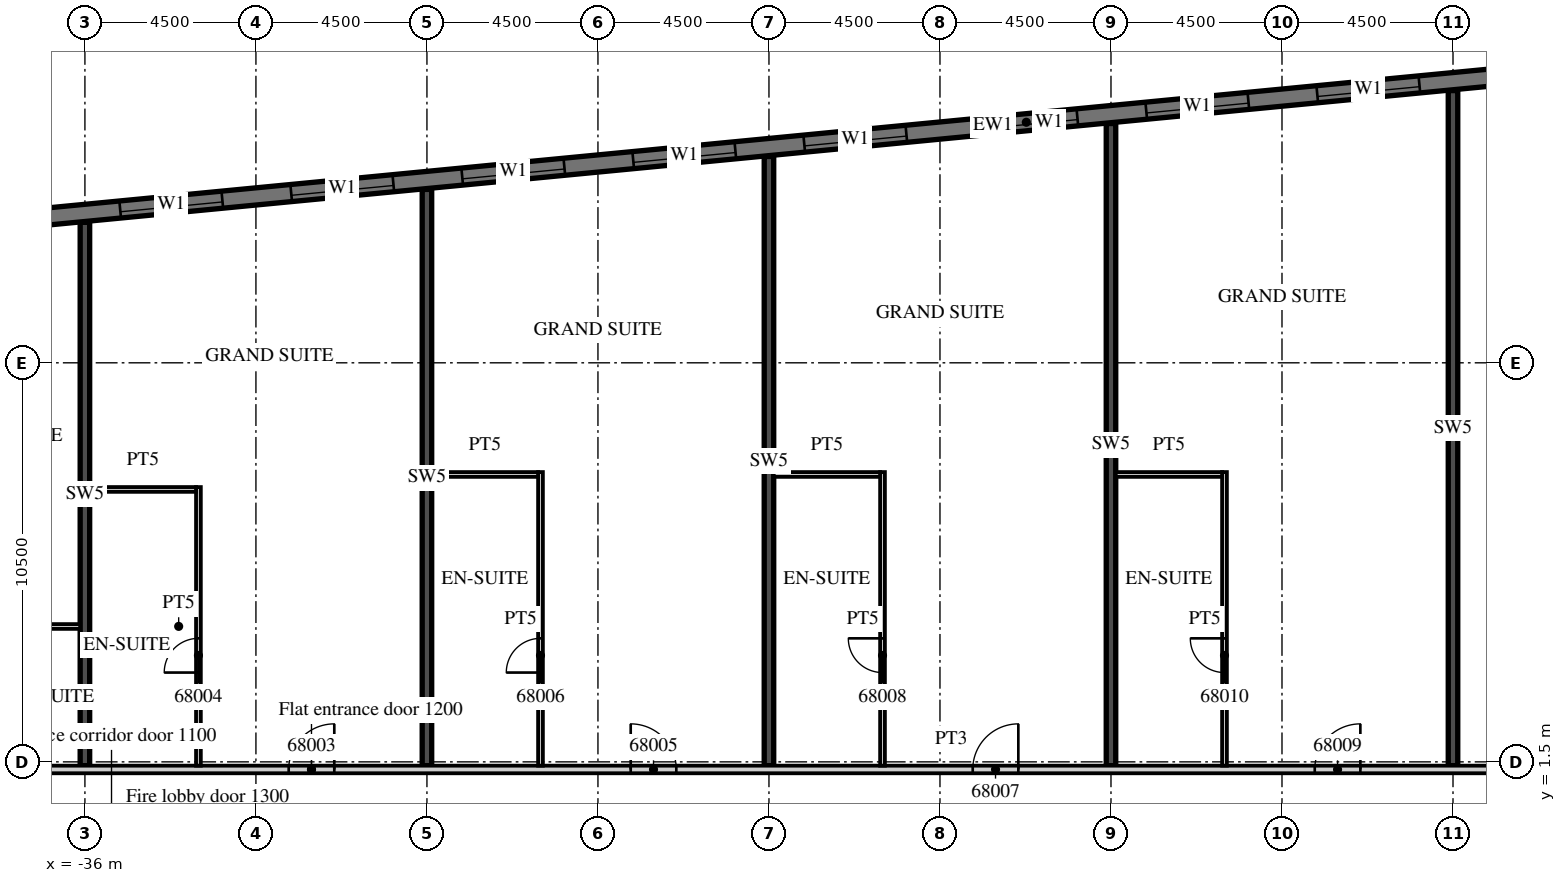
"""IFC4 building model, lengths in metres.
Left out: names, types, materials, properties, quantities, classifications, styles, units other than length and angle.
Written with IfcOpenShell. Run it as: python <this file> out.ifc"""

import sys

from ifc_helpers import new_model, si_unit, direction, frame, frame_2d, origin, place, context, subcontext, project, spatial, rectangle, extrude, element, fill, save


model = new_model("IFC4")
c1 = context("Model", 3, precision=1e-05, world=origin(), true_north=direction((0.0, 1.0)))
c2 = subcontext(c1, "Body", "Model", "MODEL_VIEW")
j1 = project(units=[si_unit("LENGTHUNIT", "METRE"), si_unit("PLANEANGLEUNIT", "RADIAN")], contexts=[c1])
p1 = place(None, origin())
s1 = spatial("IfcSite", under=j1, at=p1, CompositionType="ELEMENT")
p2 = place(p1, origin())
s2 = spatial("IfcBuilding", under=s1, at=p2, CompositionType="ELEMENT")
p3 = place(p2, frame((0.0, 0.0, 275.1)))
s3 = spatial("IfcBuildingStorey", under=s2, at=p3, CompositionType="ELEMENT", Elevation=275.1)
p4 = place(p3, frame((-36.0, 1.4, 0.0), z_axis=(0.0, 0.0, 1.0), x_axis=(0.0, 1.0, 0.0)))
e1 = element("IfcWall", 1, at=p4, inside=s3, PredefinedType="SHEAR", context=c2, shape_type="SweptSolid", body=[
    extrude(rectangle(XDim=14.296, YDim=0.25, at=frame_2d((7.148, 0.0))), origin(), (0.0, 0.0, 1.0), 3.3),
])
p5 = place(p3, frame((-27.0, 1.4, 0.0), z_axis=(0.0, 0.0, 1.0), x_axis=(0.0, 1.0, 0.0)))
e2 = element("IfcWall", 2, at=p5, inside=s3, PredefinedType="SHEAR", context=c2, shape_type="SweptSolid", body=[
    extrude(rectangle(XDim=15.163, YDim=0.25, at=frame_2d((7.582, 0.0))), origin(), (0.0, 0.0, 1.0), 3.3),
])
p6 = place(p3, frame((-18.0, 1.4, 0.0), z_axis=(0.0, 0.0, 1.0), x_axis=(0.0, 1.0, 0.0)))
e3 = element("IfcWall", 3, at=p6, inside=s3, PredefinedType="SHEAR", context=c2, shape_type="SweptSolid", body=[
    extrude(rectangle(XDim=16.03, YDim=0.25, at=frame_2d((8.015, 0.0))), origin(), (0.0, 0.0, 1.0), 3.3),
])
p7 = place(p3, frame((-9.0, 1.4, 0.0), z_axis=(0.0, 0.0, 1.0), x_axis=(0.0, 1.0, 0.0)))
e4 = element("IfcWall", 4, at=p7, inside=s3, PredefinedType="SHEAR", context=c2, shape_type="SweptSolid", body=[
    extrude(rectangle(XDim=16.896, YDim=0.25, at=frame_2d((8.448, 0.0))), origin(), (0.0, 0.0, 1.0), 3.3),
])
p8 = place(p3, frame((0.0, 1.4, 0.0), z_axis=(0.0, 0.0, 1.0), x_axis=(0.0, 1.0, 0.0)))
e5 = element("IfcWall", 5, at=p8, inside=s3, PredefinedType="SHEAR", context=c2, shape_type="SweptSolid", body=[
    extrude(rectangle(XDim=17.763, YDim=0.25, at=frame_2d((8.881, 0.0))), origin(), (0.0, 0.0, 1.0), 3.3),
])
p9 = place(p3, frame((13.521, 20.713, 0.0), z_axis=(0.0, 0.0, 1.0), x_axis=(-0.995396277313, -0.095844932638, 0.0)))
e6 = element("IfcWall", 6, at=p9, inside=s3, PredefinedType="SOLIDWALL", context=c2, shape_type="SweptSolid", body=[
    extrude(rectangle(XDim=51.495, YDim=0.45, at=frame_2d((25.748, 0.0))), origin(), (0.0, 0.0, 1.0), 3.02),
])
p10 = place(p9, frame((0.91, 0.0, 0.45)))
e7 = element("IfcOpeningElement", 7, at=p10, cuts=e6, PredefinedType="OPENING", context=c2, shape_type="SweptSolid", body=[
    extrude(rectangle(XDim=2.7, YDim=2.25, at=frame_2d((1.35, 1.125))), frame((0.0, 0.235, 0.0), z_axis=(0.0, -1.0, 0.0), x_axis=(1.0, 0.0, 0.0)), (0.0, 0.0, 1.0), 0.47),
])
p11 = place(p9, frame((5.431, 0.0, 0.45)))
e8 = element("IfcOpeningElement", 8, at=p11, cuts=e6, PredefinedType="OPENING", context=c2, shape_type="SweptSolid", body=[
    extrude(rectangle(XDim=2.7, YDim=2.25, at=frame_2d((1.35, 1.125))), frame((0.0, 0.235, 0.0), z_axis=(0.0, -1.0, 0.0), x_axis=(1.0, 0.0, 0.0)), (0.0, 0.0, 1.0), 0.47),
])
p12 = place(p9, frame((9.952, 0.0, 0.45)))
e9 = element("IfcOpeningElement", 9, at=p12, cuts=e6, PredefinedType="OPENING", context=c2, shape_type="SweptSolid", body=[
    extrude(rectangle(XDim=2.7, YDim=2.25, at=frame_2d((1.35, 1.125))), frame((0.0, 0.235, 0.0), z_axis=(0.0, -1.0, 0.0), x_axis=(1.0, 0.0, 0.0)), (0.0, 0.0, 1.0), 0.47),
])
p13 = place(p9, frame((14.473, 0.0, 0.45)))
e10 = element("IfcOpeningElement", 10, at=p13, cuts=e6, PredefinedType="OPENING", context=c2, shape_type="SweptSolid", body=[
    extrude(rectangle(XDim=2.7, YDim=2.25, at=frame_2d((1.35, 1.125))), frame((0.0, 0.235, 0.0), z_axis=(0.0, -1.0, 0.0), x_axis=(1.0, 0.0, 0.0)), (0.0, 0.0, 1.0), 0.47),
])
p14 = place(p9, frame((18.994, 0.0, 0.45)))
e11 = element("IfcOpeningElement", 11, at=p14, cuts=e6, PredefinedType="OPENING", context=c2, shape_type="SweptSolid", body=[
    extrude(rectangle(XDim=2.7, YDim=2.25, at=frame_2d((1.35, 1.125))), frame((0.0, 0.235, 0.0), z_axis=(0.0, -1.0, 0.0), x_axis=(1.0, 0.0, 0.0)), (0.0, 0.0, 1.0), 0.47),
])
p15 = place(p9, frame((23.514, 0.0, 0.45)))
e12 = element("IfcOpeningElement", 12, at=p15, cuts=e6, PredefinedType="OPENING", context=c2, shape_type="SweptSolid", body=[
    extrude(rectangle(XDim=2.7, YDim=2.25, at=frame_2d((1.35, 1.125))), frame((0.0, 0.235, 0.0), z_axis=(0.0, -1.0, 0.0), x_axis=(1.0, 0.0, 0.0)), (0.0, 0.0, 1.0), 0.47),
])
p16 = place(p9, frame((28.035, 0.0, 0.45)))
e13 = element("IfcOpeningElement", 13, at=p16, cuts=e6, PredefinedType="OPENING", context=c2, shape_type="SweptSolid", body=[
    extrude(rectangle(XDim=2.7, YDim=2.25, at=frame_2d((1.35, 1.125))), frame((0.0, 0.235, 0.0), z_axis=(0.0, -1.0, 0.0), x_axis=(1.0, 0.0, 0.0)), (0.0, 0.0, 1.0), 0.47),
])
p17 = place(p9, frame((32.556, 0.0, 0.45)))
e14 = element("IfcOpeningElement", 14, at=p17, cuts=e6, PredefinedType="OPENING", context=c2, shape_type="SweptSolid", body=[
    extrude(rectangle(XDim=2.7, YDim=2.25, at=frame_2d((1.35, 1.125))), frame((0.0, 0.235, 0.0), z_axis=(0.0, -1.0, 0.0), x_axis=(1.0, 0.0, 0.0)), (0.0, 0.0, 1.0), 0.47),
])
p18 = place(p9, frame((37.077, 0.0, 0.45)))
e15 = element("IfcOpeningElement", 15, at=p18, cuts=e6, PredefinedType="OPENING", context=c2, shape_type="SweptSolid", body=[
    extrude(rectangle(XDim=2.7, YDim=2.25, at=frame_2d((1.35, 1.125))), frame((0.0, 0.235, 0.0), z_axis=(0.0, -1.0, 0.0), x_axis=(1.0, 0.0, 0.0)), (0.0, 0.0, 1.0), 0.47),
])
p19 = place(p9, frame((41.598, 0.0, 0.45)))
e16 = element("IfcOpeningElement", 16, at=p19, cuts=e6, PredefinedType="OPENING", context=c2, shape_type="SweptSolid", body=[
    extrude(rectangle(XDim=2.7, YDim=2.25, at=frame_2d((1.35, 1.125))), frame((0.0, 0.235, 0.0), z_axis=(0.0, -1.0, 0.0), x_axis=(1.0, 0.0, 0.0)), (0.0, 0.0, 1.0), 0.47),
])
p20 = place(p9, frame((46.118, 0.0, 0.45)))
e17 = element("IfcOpeningElement", 17, at=p20, cuts=e6, PredefinedType="OPENING", context=c2, shape_type="SweptSolid", body=[
    extrude(rectangle(XDim=2.7, YDim=2.25, at=frame_2d((1.35, 1.125))), frame((0.0, 0.235, 0.0), z_axis=(0.0, -1.0, 0.0), x_axis=(1.0, 0.0, 0.0)), (0.0, 0.0, 1.0), 0.47),
])
p21 = place(p3, frame((-39.909, 1.3, 0.0), z_axis=(0.0, 0.0, 1.0), x_axis=(1.0, 0.0, 0.0)))
e18 = element("IfcWall", 18, at=p21, inside=s3, PredefinedType="PARTITIONING", context=c2, shape_type="SweptSolid", body=[
    extrude(rectangle(XDim=53.409, YDim=0.2, at=frame_2d((26.705, 0.0))), origin(), (0.0, 0.0, 1.0), 3.02),
])
p22 = place(p21, frame((0.15, 0.0, 0.0)))
e19 = element("IfcOpeningElement", 19, at=p22, cuts=e18, PredefinedType="OPENING", context=c2, shape_type="SweptSolid", body=[
    extrude(rectangle(XDim=0.9, YDim=2.1, at=frame_2d((0.45, 1.05))), frame((0.0, 0.11, 0.0), z_axis=(0.0, -1.0, 0.0), x_axis=(1.0, 0.0, 0.0)), (0.0, 0.0, 1.0), 0.22),
])
p23 = place(p21, frame((9.271, 0.0, 0.0)))
e20 = element("IfcOpeningElement", 20, at=p23, cuts=e18, PredefinedType="OPENING", context=c2, shape_type="SweptSolid", body=[
    extrude(rectangle(XDim=1.2, YDim=2.1, at=frame_2d((0.6, 1.05))), frame((0.0, 0.11, 0.0), z_axis=(0.0, -1.0, 0.0), x_axis=(1.0, 0.0, 0.0)), (0.0, 0.0, 1.0), 0.22),
])
p24 = place(p21, frame((18.271, 0.0, 0.0)))
e21 = element("IfcOpeningElement", 21, at=p24, cuts=e18, PredefinedType="OPENING", context=c2, shape_type="SweptSolid", body=[
    extrude(rectangle(XDim=1.2, YDim=2.1, at=frame_2d((0.6, 1.05))), frame((0.0, 0.11, 0.0), z_axis=(0.0, -1.0, 0.0), x_axis=(1.0, 0.0, 0.0)), (0.0, 0.0, 1.0), 0.22),
])
p25 = place(p21, frame((27.271, 0.0, 0.0)))
e22 = element("IfcOpeningElement", 22, at=p25, cuts=e18, PredefinedType="OPENING", context=c2, shape_type="SweptSolid", body=[
    extrude(rectangle(XDim=1.2, YDim=2.1, at=frame_2d((0.6, 1.05))), frame((0.0, 0.11, 0.0), z_axis=(0.0, -1.0, 0.0), x_axis=(1.0, 0.0, 0.0)), (0.0, 0.0, 1.0), 0.22),
])
p26 = place(p21, frame((36.271, 0.0, 0.0)))
e23 = element("IfcOpeningElement", 23, at=p26, cuts=e18, PredefinedType="OPENING", context=c2, shape_type="SweptSolid", body=[
    extrude(rectangle(XDim=1.2, YDim=2.1, at=frame_2d((0.6, 1.05))), frame((0.0, 0.11, 0.0), z_axis=(0.0, -1.0, 0.0), x_axis=(1.0, 0.0, 0.0)), (0.0, 0.0, 1.0), 0.22),
])
p27 = place(p21, frame((42.346, 0.0, 0.0)))
e24 = element("IfcOpeningElement", 24, at=p27, cuts=e18, PredefinedType="OPENING", context=c2, shape_type="SweptSolid", body=[
    extrude(rectangle(XDim=1.2, YDim=2.1, at=frame_2d((0.6, 1.05))), frame((0.0, 0.11, 0.0), z_axis=(0.0, -1.0, 0.0), x_axis=(1.0, 0.0, 0.0)), (0.0, 0.0, 1.0), 0.22),
])
p28 = place(p21, frame((51.834, 0.0, 0.0)))
e25 = element("IfcOpeningElement", 25, at=p28, cuts=e18, PredefinedType="OPENING", context=c2, shape_type="SweptSolid", body=[
    extrude(rectangle(XDim=1.0, YDim=2.1, at=frame_2d((0.5, 1.05))), frame((0.0, 0.11, 0.0), z_axis=(0.0, -1.0, 0.0), x_axis=(1.0, 0.0, 0.0)), (0.0, 0.0, 1.0), 0.22),
])
p29 = place(p3, frame((-38.878, 5.062, 0.0), z_axis=(0.0, 0.0, 1.0), x_axis=(1.0, 0.0, 0.0)))
e26 = element("IfcWall", 26, at=p29, inside=s3, PredefinedType="PARTITIONING", context=c2, shape_type="SweptSolid", body=[
    extrude(rectangle(XDim=2.753, YDim=0.125, at=frame_2d((1.376, 0.0))), origin(), (0.0, 0.0, 1.0), 3.02),
])
p30 = place(p3, frame((-33.013, 1.4, 0.0), z_axis=(0.0, 0.0, 1.0), x_axis=(0.0, 1.0, 0.0)))
e27 = element("IfcWall", 27, at=p30, inside=s3, PredefinedType="PARTITIONING", context=c2, shape_type="SweptSolid", body=[
    extrude(rectangle(XDim=7.33, YDim=0.125, at=frame_2d((3.665, 0.0))), origin(), (0.0, 0.0, 1.0), 3.02),
])
p31 = place(p30, frame((2.45, 0.0, 0.0)))
e28 = element("IfcOpeningElement", 28, at=p31, cuts=e27, PredefinedType="OPENING", context=c2, shape_type="SweptSolid", body=[
    extrude(rectangle(XDim=0.9, YDim=2.1, at=frame_2d((0.45, 1.05))), frame((0.0, 0.073, 0.0), z_axis=(0.0, -1.0, 0.0), x_axis=(1.0, 0.0, 0.0)), (0.0, 0.0, 1.0), 0.145),
])
p32 = place(p3, frame((-35.875, 8.668, 0.0), z_axis=(0.0, 0.0, 1.0), x_axis=(1.0, 0.0, 0.0)))
e29 = element("IfcWall", 29, at=p32, inside=s3, PredefinedType="PARTITIONING", context=c2, shape_type="SweptSolid", body=[
    extrude(rectangle(XDim=2.8, YDim=0.125, at=frame_2d((1.4, 0.0))), origin(), (0.0, 0.0, 1.0), 3.02),
])
p33 = place(p3, frame((-24.012, 1.4, 0.0), z_axis=(0.0, 0.0, 1.0), x_axis=(0.0, 1.0, 0.0)))
e30 = element("IfcWall", 30, at=p33, inside=s3, PredefinedType="PARTITIONING", context=c2, shape_type="SweptSolid", body=[
    extrude(rectangle(XDim=7.725, YDim=0.125, at=frame_2d((3.863, 0.0))), origin(), (0.0, 0.0, 1.0), 3.02),
])
p34 = place(p33, frame((2.45, 0.0, 0.0)))
e31 = element("IfcOpeningElement", 31, at=p34, cuts=e30, PredefinedType="OPENING", context=c2, shape_type="SweptSolid", body=[
    extrude(rectangle(XDim=0.9, YDim=2.1, at=frame_2d((0.45, 1.05))), frame((0.0, 0.073, 0.0), z_axis=(0.0, -1.0, 0.0), x_axis=(1.0, 0.0, 0.0)), (0.0, 0.0, 1.0), 0.145),
])
p35 = place(p3, frame((-26.875, 9.062, 0.0), z_axis=(0.0, 0.0, 1.0), x_axis=(1.0, 0.0, 0.0)))
e32 = element("IfcWall", 32, at=p35, inside=s3, PredefinedType="PARTITIONING", context=c2, shape_type="SweptSolid", body=[
    extrude(rectangle(XDim=2.8, YDim=0.125, at=frame_2d((1.4, 0.0))), origin(), (0.0, 0.0, 1.0), 3.02),
])
p36 = place(p3, frame((-15.012, 1.4, 0.0), z_axis=(0.0, 0.0, 1.0), x_axis=(0.0, 1.0, 0.0)))
e33 = element("IfcWall", 33, at=p36, inside=s3, PredefinedType="PARTITIONING", context=c2, shape_type="SweptSolid", body=[
    extrude(rectangle(XDim=7.725, YDim=0.125, at=frame_2d((3.863, 0.0))), origin(), (0.0, 0.0, 1.0), 3.02),
])
p37 = place(p36, frame((2.45, 0.0, 0.0)))
e34 = element("IfcOpeningElement", 34, at=p37, cuts=e33, PredefinedType="OPENING", context=c2, shape_type="SweptSolid", body=[
    extrude(rectangle(XDim=0.9, YDim=2.1, at=frame_2d((0.45, 1.05))), frame((0.0, 0.073, 0.0), z_axis=(0.0, -1.0, 0.0), x_axis=(1.0, 0.0, 0.0)), (0.0, 0.0, 1.0), 0.145),
])
p38 = place(p3, frame((-17.875, 9.062, 0.0), z_axis=(0.0, 0.0, 1.0), x_axis=(1.0, 0.0, 0.0)))
e35 = element("IfcWall", 35, at=p38, inside=s3, PredefinedType="PARTITIONING", context=c2, shape_type="SweptSolid", body=[
    extrude(rectangle(XDim=2.8, YDim=0.125, at=frame_2d((1.4, 0.0))), origin(), (0.0, 0.0, 1.0), 3.02),
])
p39 = place(p3, frame((-6.013, 1.4, 0.0), z_axis=(0.0, 0.0, 1.0), x_axis=(0.0, 1.0, 0.0)))
e36 = element("IfcWall", 36, at=p39, inside=s3, PredefinedType="PARTITIONING", context=c2, shape_type="SweptSolid", body=[
    extrude(rectangle(XDim=7.725, YDim=0.125, at=frame_2d((3.863, 0.0))), origin(), (0.0, 0.0, 1.0), 3.02),
])
p40 = place(p39, frame((2.45, 0.0, 0.0)))
e37 = element("IfcOpeningElement", 37, at=p40, cuts=e36, PredefinedType="OPENING", context=c2, shape_type="SweptSolid", body=[
    extrude(rectangle(XDim=0.9, YDim=2.1, at=frame_2d((0.45, 1.05))), frame((0.0, 0.073, 0.0), z_axis=(0.0, -1.0, 0.0), x_axis=(1.0, 0.0, 0.0)), (0.0, 0.0, 1.0), 0.145),
])
p41 = place(p3, frame((-8.875, 9.062, 0.0), z_axis=(0.0, 0.0, 1.0), x_axis=(1.0, 0.0, 0.0)))
e38 = element("IfcWall", 38, at=p41, inside=s3, PredefinedType="PARTITIONING", context=c2, shape_type="SweptSolid", body=[
    extrude(rectangle(XDim=2.8, YDim=0.125, at=frame_2d((1.4, 0.0))), origin(), (0.0, 0.0, 1.0), 3.02),
])
p42 = place(p13, origin())
e39 = element("IfcWindow", 39, at=p42, inside=s3, PartitioningType="SINGLE_PANEL", PredefinedType="WINDOW", context=c2, shape_type="SweptSolid", body=[
    extrude(rectangle(XDim=2.7, YDim=2.25, at=frame_2d((1.35, 1.125))), frame((0.0, 0.09, 0.0), z_axis=(0.0, -1.0, 0.0), x_axis=(1.0, 0.0, 0.0)), (0.0, 0.0, 1.0), 0.06),
])
fill(e10, e39)
p43 = place(p14, origin())
e40 = element("IfcWindow", 40, at=p43, inside=s3, PartitioningType="SINGLE_PANEL", PredefinedType="WINDOW", context=c2, shape_type="SweptSolid", body=[
    extrude(rectangle(XDim=2.7, YDim=2.25, at=frame_2d((1.35, 1.125))), frame((0.0, 0.09, 0.0), z_axis=(0.0, -1.0, 0.0), x_axis=(1.0, 0.0, 0.0)), (0.0, 0.0, 1.0), 0.06),
])
fill(e11, e40)
p44 = place(p15, origin())
e41 = element("IfcWindow", 41, at=p44, inside=s3, PartitioningType="SINGLE_PANEL", PredefinedType="WINDOW", context=c2, shape_type="SweptSolid", body=[
    extrude(rectangle(XDim=2.7, YDim=2.25, at=frame_2d((1.35, 1.125))), frame((0.0, 0.09, 0.0), z_axis=(0.0, -1.0, 0.0), x_axis=(1.0, 0.0, 0.0)), (0.0, 0.0, 1.0), 0.06),
])
fill(e12, e41)
p45 = place(p16, origin())
e42 = element("IfcWindow", 42, at=p45, inside=s3, PartitioningType="SINGLE_PANEL", PredefinedType="WINDOW", context=c2, shape_type="SweptSolid", body=[
    extrude(rectangle(XDim=2.7, YDim=2.25, at=frame_2d((1.35, 1.125))), frame((0.0, 0.09, 0.0), z_axis=(0.0, -1.0, 0.0), x_axis=(1.0, 0.0, 0.0)), (0.0, 0.0, 1.0), 0.06),
])
fill(e13, e42)
p46 = place(p17, origin())
e43 = element("IfcWindow", 43, at=p46, inside=s3, PartitioningType="SINGLE_PANEL", PredefinedType="WINDOW", context=c2, shape_type="SweptSolid", body=[
    extrude(rectangle(XDim=2.7, YDim=2.25, at=frame_2d((1.35, 1.125))), frame((0.0, 0.09, 0.0), z_axis=(0.0, -1.0, 0.0), x_axis=(1.0, 0.0, 0.0)), (0.0, 0.0, 1.0), 0.06),
])
fill(e14, e43)
p47 = place(p18, origin())
e44 = element("IfcWindow", 44, at=p47, inside=s3, PartitioningType="SINGLE_PANEL", PredefinedType="WINDOW", context=c2, shape_type="SweptSolid", body=[
    extrude(rectangle(XDim=2.7, YDim=2.25, at=frame_2d((1.35, 1.125))), frame((0.0, 0.09, 0.0), z_axis=(0.0, -1.0, 0.0), x_axis=(1.0, 0.0, 0.0)), (0.0, 0.0, 1.0), 0.06),
])
fill(e15, e44)
p48 = place(p19, origin())
e45 = element("IfcWindow", 45, at=p48, inside=s3, PartitioningType="SINGLE_PANEL", PredefinedType="WINDOW", context=c2, shape_type="SweptSolid", body=[
    extrude(rectangle(XDim=2.7, YDim=2.25, at=frame_2d((1.35, 1.125))), frame((0.0, 0.09, 0.0), z_axis=(0.0, -1.0, 0.0), x_axis=(1.0, 0.0, 0.0)), (0.0, 0.0, 1.0), 0.06),
])
fill(e16, e45)
p49 = place(p20, origin())
e46 = element("IfcWindow", 46, at=p49, inside=s3, PartitioningType="SINGLE_PANEL", PredefinedType="WINDOW", context=c2, shape_type="SweptSolid", body=[
    extrude(rectangle(XDim=2.7, YDim=2.25, at=frame_2d((1.35, 1.125))), frame((0.0, 0.09, 0.0), z_axis=(0.0, -1.0, 0.0), x_axis=(1.0, 0.0, 0.0)), (0.0, 0.0, 1.0), 0.06),
])
fill(e17, e46)
p50 = place(p23, origin())
e47 = element("IfcDoor", 47, at=p50, inside=s3, OperationType="SINGLE_SWING_RIGHT", PredefinedType="DOOR", context=c2, shape_type="SweptSolid", body=[
    extrude(rectangle(XDim=1.2, YDim=2.1, at=frame_2d((0.6, 1.05))), frame((0.0, 0.025, 0.0), z_axis=(0.0, -1.0, 0.0), x_axis=(1.0, 0.0, 0.0)), (0.0, 0.0, 1.0), 0.05),
])
fill(e20, e47)
p51 = place(p31, origin())
e48 = element("IfcDoor", 48, at=p51, inside=s3, OperationType="SINGLE_SWING_LEFT", PredefinedType="DOOR", context=c2, shape_type="SweptSolid", body=[
    extrude(rectangle(XDim=0.9, YDim=2.1, at=frame_2d((0.45, 1.05))), frame((0.0, 0.025, 0.0), z_axis=(0.0, -1.0, 0.0), x_axis=(1.0, 0.0, 0.0)), (0.0, 0.0, 1.0), 0.05),
])
fill(e28, e48)
p52 = place(p24, origin())
e49 = element("IfcDoor", 49, at=p52, inside=s3, OperationType="SINGLE_SWING_LEFT", PredefinedType="DOOR", context=c2, shape_type="SweptSolid", body=[
    extrude(rectangle(XDim=1.2, YDim=2.1, at=frame_2d((0.6, 1.05))), frame((0.0, 0.025, 0.0), z_axis=(0.0, -1.0, 0.0), x_axis=(1.0, 0.0, 0.0)), (0.0, 0.0, 1.0), 0.05),
])
fill(e21, e49)
p53 = place(p34, origin())
e50 = element("IfcDoor", 50, at=p53, inside=s3, OperationType="SINGLE_SWING_LEFT", PredefinedType="DOOR", context=c2, shape_type="SweptSolid", body=[
    extrude(rectangle(XDim=0.9, YDim=2.1, at=frame_2d((0.45, 1.05))), frame((0.0, 0.025, 0.0), z_axis=(0.0, -1.0, 0.0), x_axis=(1.0, 0.0, 0.0)), (0.0, 0.0, 1.0), 0.05),
])
fill(e31, e50)
p54 = place(p25, origin())
e51 = element("IfcDoor", 51, at=p54, inside=s3, OperationType="SINGLE_SWING_RIGHT", PredefinedType="DOOR", context=c2, shape_type="SweptSolid", body=[
    extrude(rectangle(XDim=1.2, YDim=2.1, at=frame_2d((0.6, 1.05))), frame((0.0, 0.025, 0.0), z_axis=(0.0, -1.0, 0.0), x_axis=(1.0, 0.0, 0.0)), (0.0, 0.0, 1.0), 0.05),
])
fill(e22, e51)
p55 = place(p37, origin())
e52 = element("IfcDoor", 52, at=p55, inside=s3, OperationType="SINGLE_SWING_RIGHT", PredefinedType="DOOR", context=c2, shape_type="SweptSolid", body=[
    extrude(rectangle(XDim=0.9, YDim=2.1, at=frame_2d((0.45, 1.05))), frame((0.0, 0.025, 0.0), z_axis=(0.0, -1.0, 0.0), x_axis=(1.0, 0.0, 0.0)), (0.0, 0.0, 1.0), 0.05),
])
fill(e34, e52)
p56 = place(p26, origin())
e53 = element("IfcDoor", 53, at=p56, inside=s3, OperationType="SINGLE_SWING_RIGHT", PredefinedType="DOOR", context=c2, shape_type="SweptSolid", body=[
    extrude(rectangle(XDim=1.2, YDim=2.1, at=frame_2d((0.6, 1.05))), frame((0.0, 0.025, 0.0), z_axis=(0.0, -1.0, 0.0), x_axis=(1.0, 0.0, 0.0)), (0.0, 0.0, 1.0), 0.05),
])
fill(e23, e53)
p57 = place(p40, origin())
e54 = element("IfcDoor", 54, at=p57, inside=s3, OperationType="SINGLE_SWING_RIGHT", PredefinedType="DOOR", context=c2, shape_type="SweptSolid", body=[
    extrude(rectangle(XDim=0.9, YDim=2.1, at=frame_2d((0.45, 1.05))), frame((0.0, 0.025, 0.0), z_axis=(0.0, -1.0, 0.0), x_axis=(1.0, 0.0, 0.0)), (0.0, 0.0, 1.0), 0.05),
])
fill(e37, e54)
save(model, sys.argv[1])
